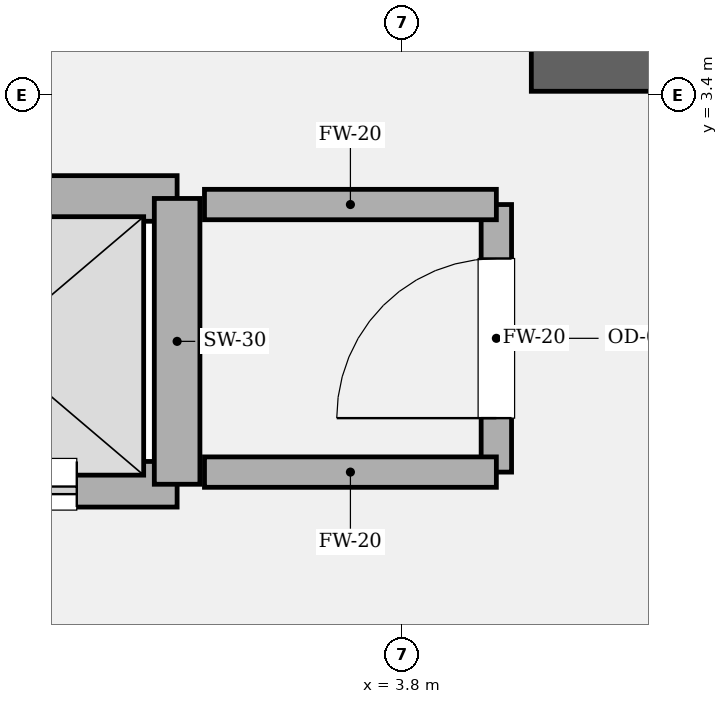
"""IFC4 building model, lengths in metres.
Left out: names, types, materials, properties, quantities, classifications, styles, units other than length and angle.
Written with IfcOpenShell. Run it as: python <this file> out.ifc"""

import sys

from ifc_helpers import new_model, si_unit, direction, frame, frame_2d, origin, place, context, subcontext, project, spatial, rectangle, extrude, element, fill, save


model = new_model("IFC4")
c1 = context("Model", 3, precision=1e-05, world=origin(), true_north=direction((0.0, 1.0)))
c2 = subcontext(c1, "Body", "Model", "MODEL_VIEW")
j1 = project(units=[si_unit("LENGTHUNIT", "METRE"), si_unit("PLANEANGLEUNIT", "RADIAN")], contexts=[c1])
p1 = place(None, origin())
s1 = spatial("IfcSite", under=j1, at=p1, CompositionType="ELEMENT")
p2 = place(p1, origin())
s2 = spatial("IfcBuilding", under=s1, at=p2, CompositionType="ELEMENT")
p3 = place(p2, frame((0.0, 0.0, 313.2)))
s3 = spatial("IfcBuildingStorey", under=s2, at=p3, CompositionType="ELEMENT", Elevation=313.2)
p4 = place(p3, frame((4.65, 3.6, 0.0), z_axis=(0.0, 0.0, 1.0), x_axis=(1.0, 0.0, 0.0)))
e1 = element("IfcWall", 1, at=p4, inside=s3, PredefinedType="SOLIDWALL", context=c2, shape_type="SweptSolid", body=[
    extrude(rectangle(XDim=5.275, YDim=0.35, at=frame_2d((2.638, 0.0))), origin(), (0.0, 0.0, 1.0), 4.2),
])
p5 = place(p3, frame((-2.32, 0.84, 0.0), z_axis=(0.0, 0.0, 1.0), x_axis=(1.0, 0.0, 0.0)))
e2 = element("IfcWall", 2, at=p5, inside=s3, PredefinedType="SOLIDWALL", context=c2, shape_type="SweptSolid", body=[
    extrude(rectangle(XDim=4.64, YDim=0.3, at=frame_2d((2.32, 0.0))), origin(), (0.0, 0.0, 1.0), 3.92),
])
p6 = place(p5, frame((0.66, 0.0, 0.0)))
e3 = element("IfcOpeningElement", 3, at=p6, cuts=e2, PredefinedType="OPENING", context=c2, shape_type="SweptSolid", body=[
    extrude(rectangle(XDim=1.12, YDim=2.25, at=frame_2d((0.56, 1.125))), frame((0.0, 0.16, 0.0), z_axis=(0.0, -1.0, 0.0), x_axis=(1.0, 0.0, 0.0)), (0.0, 0.0, 1.0), 0.32),
])
p7 = place(p5, frame((2.86, 0.0, 0.0)))
e4 = element("IfcOpeningElement", 4, at=p7, cuts=e2, PredefinedType="OPENING", context=c2, shape_type="SweptSolid", body=[
    extrude(rectangle(XDim=1.12, YDim=2.25, at=frame_2d((0.56, 1.125))), frame((0.0, 0.16, 0.0), z_axis=(0.0, -1.0, 0.0), x_axis=(1.0, 0.0, 0.0)), (0.0, 0.0, 1.0), 0.32),
])
p8 = place(p3, frame((-2.32, 2.72, 0.0), z_axis=(0.0, 0.0, 1.0), x_axis=(1.0, 0.0, 0.0)))
e5 = element("IfcWall", 5, at=p8, inside=s3, PredefinedType="SOLIDWALL", context=c2, shape_type="SweptSolid", body=[
    extrude(rectangle(XDim=4.64, YDim=0.3, at=frame_2d((2.32, 0.0))), origin(), (0.0, 0.0, 1.0), 3.92),
])
p9 = place(p3, frame((2.32, 0.84, 0.0), z_axis=(0.0, 0.0, 1.0), x_axis=(0.0, 1.0, 0.0)))
e6 = element("IfcWall", 6, at=p9, inside=s3, PredefinedType="SOLIDWALL", context=c2, shape_type="SweptSolid", body=[
    extrude(rectangle(XDim=1.88, YDim=0.3, at=frame_2d((0.94, 0.0))), origin(), (0.0, 0.0, 1.0), 3.92),
])
p10 = place(p3, frame((4.42, 0.92, 0.0), z_axis=(0.0, 0.0, 1.0), x_axis=(0.0, 1.0, 0.0)))
e7 = element("IfcWall", 7, at=p10, inside=s3, PredefinedType="SOLIDWALL", context=c2, shape_type="SweptSolid", body=[
    extrude(rectangle(XDim=1.76, YDim=0.2, at=frame_2d((0.88, 0.0))), origin(), (0.0, 0.0, 1.0), 3.92),
])
p11 = place(p10, frame((0.355, 0.0, 0.0)))
e8 = element("IfcOpeningElement", 8, at=p11, cuts=e7, PredefinedType="OPENING", context=c2, shape_type="SweptSolid", body=[
    extrude(rectangle(XDim=1.05, YDim=2.2, at=frame_2d((0.525, 1.1))), frame((0.0, 0.11, 0.0), z_axis=(0.0, -1.0, 0.0), x_axis=(1.0, 0.0, 0.0)), (0.0, 0.0, 1.0), 0.22),
])
for number, where, z_axis, x_axis in (
    (9, (4.42, 2.68, 0.0), (0.0, 0.0, 1.0), (-1.0, 0.0, 0.0)),
    (10, (2.5, 0.92, 0.0), (0.0, 0.0, 1.0), (1.0, 0.0, 0.0)),
):
    element("IfcWall", number, at=place(p3, frame(where, z_axis=z_axis, x_axis=x_axis)), inside=s3, PredefinedType="SOLIDWALL", context=c2, shape_type="SweptSolid", body=[
        extrude(rectangle(XDim=1.92, YDim=0.2, at=frame_2d((0.96, 0.0))), origin(), (0.0, 0.0, 1.0), 3.92),
    ])
p12 = place(p7, origin())
e11 = element("IfcDoor", 11, at=p12, inside=s3, OperationType="DOUBLE_DOOR_SLIDING", PredefinedType="DOOR", context=c2, shape_type="SweptSolid", body=[
    extrude(rectangle(XDim=1.12, YDim=2.25, at=frame_2d((0.56, 1.125))), frame((0.0, 0.025, 0.0), z_axis=(0.0, -1.0, 0.0), x_axis=(1.0, 0.0, 0.0)), (0.0, 0.0, 1.0), 0.05),
])
fill(e4, e11)
p13 = place(p11, origin())
e12 = element("IfcDoor", 12, at=p13, inside=s3, OperationType="SINGLE_SWING_LEFT", PredefinedType="DOOR", context=c2, shape_type="SweptSolid", body=[
    extrude(rectangle(XDim=1.05, YDim=2.2, at=frame_2d((0.525, 1.1))), frame((0.0, 0.025, 0.0), z_axis=(0.0, -1.0, 0.0), x_axis=(1.0, 0.0, 0.0)), (0.0, 0.0, 1.0), 0.05),
])
fill(e8, e12)
save(model, sys.argv[1])
